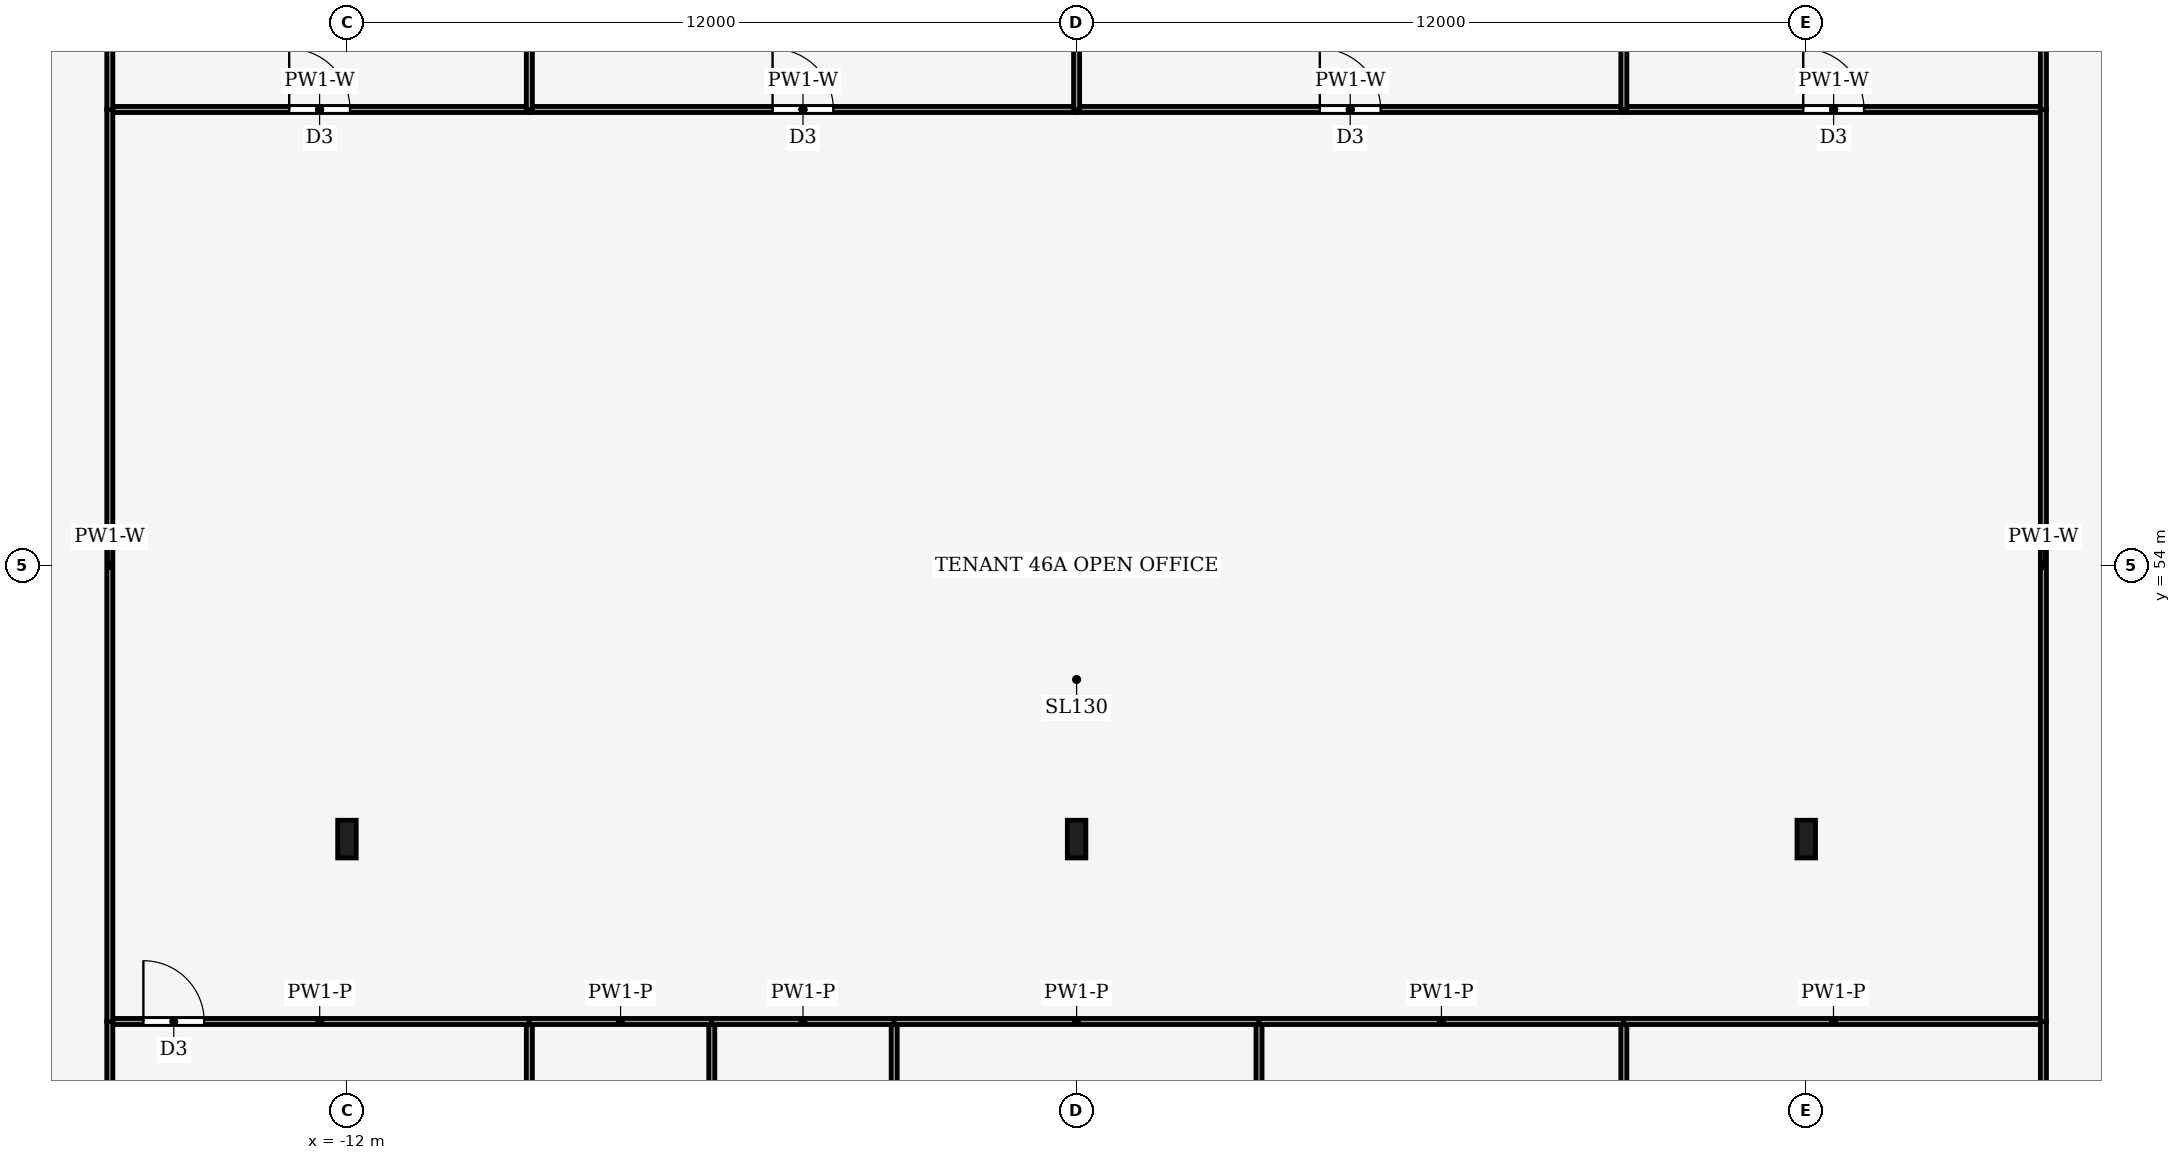
"""IFC4 building model, lengths in metres.
Left out: names, types, materials, properties, quantities, classifications, styles, units other than length and angle.
Written with IfcOpenShell. Run it as: python <this file> out.ifc"""

import sys

from ifc_helpers import new_model, si_unit, direction, frame, frame_2d, origin, origin_2d, place, context, subcontext, project, spatial, rectangle, i_section, extrude, element, fill, save


model = new_model("IFC4")
c1 = context("Model", 3, precision=1e-05, world=origin(), true_north=direction((0.0, 1.0)))
c2 = subcontext(c1, "Body", "Model", "MODEL_VIEW")
j1 = project(units=[si_unit("LENGTHUNIT", "METRE"), si_unit("PLANEANGLEUNIT", "RADIAN")], contexts=[c1])
p1 = place(None, origin())
s1 = spatial("IfcSite", under=j1, at=p1, CompositionType="ELEMENT")
p2 = place(p1, origin())
s2 = spatial("IfcBuilding", under=s1, at=p2, CompositionType="ELEMENT")
p3 = place(p2, frame((0.0, 0.0, 202.0)))
s3 = spatial("IfcBuildingStorey", under=s2, at=p3, CompositionType="ELEMENT", Elevation=202.0)
for number, where, z_axis, x_axis in (
    (1, (-12.0, 49.5, 0.0), (0.0, 0.0, 1.0), (1.0, 0.0, 0.0)),
    (2, (0.0, 49.5, 0.0), (0.0, 0.0, 1.0), (1.0, 0.0, 0.0)),
    (3, (12.0, 49.5, 0.0), (0.0, 0.0, 1.0), (1.0, 0.0, 0.0)),
):
    element("IfcColumn", number, at=place(p3, frame(where, z_axis=z_axis, x_axis=x_axis)), inside=s3, PredefinedType="COLUMN", context=c2, shape_type="SweptSolid", body=[
        extrude(i_section(OverallWidth=0.305, OverallDepth=0.62, WebThickness=0.021, FlangeThickness=0.04, FilletRadius=0.027, at=origin_2d()), origin(), (0.0, 0.0, 1.0), 4.0),
    ])
p4 = place(p3, frame((-9.0, 46.5, 0.0), z_axis=(0.0, 0.0, 1.0), x_axis=(0.0, -1.0, 0.0)))
e4 = element("IfcWall", 4, at=p4, inside=s3, PredefinedType="PARTITIONING", context=c2, shape_type="SweptSolid", body=[
    extrude(rectangle(XDim=5.6, YDim=0.1, at=frame_2d((2.8, 0.0))), origin(), (0.0, 0.0, 1.0), 3.87),
])
p5 = place(p4, frame((2.3, 0.0, 0.0)))
e5 = element("IfcOpeningElement", 5, at=p5, cuts=e4, PredefinedType="OPENING", context=c2, shape_type="SweptSolid", body=[
    extrude(rectangle(XDim=1.0, YDim=2.1, at=frame_2d((0.5, 1.05))), frame((0.0, 0.06, 0.0), z_axis=(0.0, -1.0, 0.0), x_axis=(1.0, 0.0, 0.0)), (0.0, 0.0, 1.0), 0.12),
])
p6 = place(p3, frame((-15.9, 46.5, 0.0), z_axis=(0.0, 0.0, 1.0), x_axis=(1.0, 0.0, 0.0)))
e6 = element("IfcWall", 6, at=p6, inside=s3, PredefinedType="PARTITIONING", context=c2, shape_type="SweptSolid", body=[
    extrude(rectangle(XDim=6.904, YDim=0.1, at=frame_2d((3.452, 0.0))), origin(), (0.0, 0.0, 1.0), 3.44),
])
p7 = place(p6, frame((0.552, 0.0, 0.0)))
e7 = element("IfcOpeningElement", 7, at=p7, cuts=e6, PredefinedType="OPENING", context=c2, shape_type="SweptSolid", body=[
    extrude(rectangle(XDim=1.0, YDim=2.1, at=frame_2d((0.5, 1.05))), frame((0.0, 0.06, 0.0), z_axis=(0.0, -1.0, 0.0), x_axis=(1.0, 0.0, 0.0)), (0.0, 0.0, 1.0), 0.12),
])
p8 = place(p3, frame((-15.9, 46.504, 0.0), z_axis=(0.0, 0.0, 1.0), x_axis=(0.0, -1.0, 0.0)))
e8 = element("IfcWall", 8, at=p8, inside=s3, PredefinedType="PARTITIONING", context=c2, shape_type="SweptSolid", body=[
    extrude(rectangle(XDim=5.608, YDim=0.1, at=frame_2d((2.804, 0.0))), origin(), (0.0, 0.0, 1.0), 3.44),
])
p9 = place(p3, frame((-6.0, 46.5, 0.0), z_axis=(0.0, 0.0, 1.0), x_axis=(0.0, -1.0, 0.0)))
e9 = element("IfcWall", 9, at=p9, inside=s3, PredefinedType="PARTITIONING", context=c2, shape_type="SweptSolid", body=[
    extrude(rectangle(XDim=5.6, YDim=0.1, at=frame_2d((2.8, 0.0))), origin(), (0.0, 0.0, 1.0), 3.87),
])
p10 = place(p9, frame((2.3, 0.0, 0.0)))
e10 = element("IfcOpeningElement", 10, at=p10, cuts=e9, PredefinedType="OPENING", context=c2, shape_type="SweptSolid", body=[
    extrude(rectangle(XDim=1.0, YDim=2.1, at=frame_2d((0.5, 1.05))), frame((0.0, 0.06, 0.0), z_axis=(0.0, -1.0, 0.0), x_axis=(1.0, 0.0, 0.0)), (0.0, 0.0, 1.0), 0.12),
])
p11 = place(p3, frame((-5.996, 46.5, 0.0), z_axis=(0.0, 0.0, 1.0), x_axis=(-1.0, 0.0, 0.0)))
e11 = element("IfcWall", 11, at=p11, inside=s3, PredefinedType="PARTITIONING", context=c2, shape_type="SweptSolid", body=[
    extrude(rectangle(XDim=3.008, YDim=0.1, at=frame_2d((1.504, 0.0))), origin(), (0.0, 0.0, 1.0), 3.44),
])
p12 = place(p3, frame((-3.0, 40.9, 0.0), z_axis=(0.0, 0.0, 1.0), x_axis=(0.0, 1.0, 0.0)))
e12 = element("IfcWall", 12, at=p12, inside=s3, PredefinedType="PARTITIONING", context=c2, shape_type="SweptSolid", body=[
    extrude(rectangle(XDim=5.6, YDim=0.1, at=frame_2d((2.8, 0.0))), origin(), (0.0, 0.0, 1.0), 3.87),
])
p13 = place(p3, frame((-2.996, 46.5, 0.0), z_axis=(0.0, 0.0, 1.0), x_axis=(-1.0, 0.0, 0.0)))
e13 = element("IfcWall", 13, at=p13, inside=s3, PredefinedType="PARTITIONING", context=c2, shape_type="SweptSolid", body=[
    extrude(rectangle(XDim=3.008, YDim=0.1, at=frame_2d((1.504, 0.0))), origin(), (0.0, 0.0, 1.0), 3.44),
])
p14 = place(p3, frame((3.0, 40.9, 0.0), z_axis=(0.0, 0.0, 1.0), x_axis=(0.0, 1.0, 0.0)))
e14 = element("IfcWall", 14, at=p14, inside=s3, PredefinedType="PARTITIONING", context=c2, shape_type="SweptSolid", body=[
    extrude(rectangle(XDim=5.6, YDim=0.1, at=frame_2d((2.8, 0.0))), origin(), (0.0, 0.0, 1.0), 3.87),
])
p15 = place(p3, frame((3.004, 46.5, 0.0), z_axis=(0.0, 0.0, 1.0), x_axis=(-1.0, 0.0, 0.0)))
e15 = element("IfcWall", 15, at=p15, inside=s3, PredefinedType="PARTITIONING", context=c2, shape_type="SweptSolid", body=[
    extrude(rectangle(XDim=6.008, YDim=0.1, at=frame_2d((3.004, 0.0))), origin(), (0.0, 0.0, 1.0), 3.44),
])
p16 = place(p3, frame((9.0, 40.9, 0.0), z_axis=(0.0, 0.0, 1.0), x_axis=(0.0, 1.0, 0.0)))
e16 = element("IfcWall", 16, at=p16, inside=s3, PredefinedType="PARTITIONING", context=c2, shape_type="SweptSolid", body=[
    extrude(rectangle(XDim=5.6, YDim=0.1, at=frame_2d((2.8, 0.0))), origin(), (0.0, 0.0, 1.0), 3.87),
])
p17 = place(p3, frame((9.004, 46.5, 0.0), z_axis=(0.0, 0.0, 1.0), x_axis=(-1.0, 0.0, 0.0)))
e17 = element("IfcWall", 17, at=p17, inside=s3, PredefinedType="PARTITIONING", context=c2, shape_type="SweptSolid", body=[
    extrude(rectangle(XDim=6.008, YDim=0.1, at=frame_2d((3.004, 0.0))), origin(), (0.0, 0.0, 1.0), 3.44),
])
p18 = place(p3, frame((15.9, 46.5, 0.0), z_axis=(0.0, 0.0, 1.0), x_axis=(-1.0, 0.0, 0.0)))
e18 = element("IfcWall", 18, at=p18, inside=s3, PredefinedType="PARTITIONING", context=c2, shape_type="SweptSolid", body=[
    extrude(rectangle(XDim=6.904, YDim=0.1, at=frame_2d((3.452, 0.0))), origin(), (0.0, 0.0, 1.0), 3.44),
])
p19 = place(p3, frame((15.9, 40.896, 0.0), z_axis=(0.0, 0.0, 1.0), x_axis=(0.0, 1.0, 0.0)))
e19 = element("IfcWall", 19, at=p19, inside=s3, PredefinedType="PARTITIONING", context=c2, shape_type="SweptSolid", body=[
    extrude(rectangle(XDim=5.608, YDim=0.1, at=frame_2d((2.804, 0.0))), origin(), (0.0, 0.0, 1.0), 3.44),
])
p20 = place(p3, frame((-15.9, 61.5, 0.0), z_axis=(0.0, 0.0, 1.0), x_axis=(1.0, 0.0, 0.0)))
e20 = element("IfcWall", 20, at=p20, inside=s3, PredefinedType="PARTITIONING", context=c2, shape_type="SweptSolid", body=[
    extrude(rectangle(XDim=6.9, YDim=0.1, at=frame_2d((3.45, 0.0))), origin(), (0.0, 0.0, 1.0), 3.24),
])
p21 = place(p20, frame((2.95, 0.0, 0.0)))
e21 = element("IfcOpeningElement", 21, at=p21, cuts=e20, PredefinedType="OPENING", context=c2, shape_type="SweptSolid", body=[
    extrude(rectangle(XDim=1.0, YDim=2.1, at=frame_2d((0.5, 1.05))), frame((0.0, 0.06, 0.0), z_axis=(0.0, -1.0, 0.0), x_axis=(1.0, 0.0, 0.0)), (0.0, 0.0, 1.0), 0.12),
])
p22 = place(p3, frame((-9.0, 61.5, 0.0), z_axis=(0.0, 0.0, 1.0), x_axis=(1.0, 0.0, 0.0)))
e22 = element("IfcWall", 22, at=p22, inside=s3, PredefinedType="PARTITIONING", context=c2, shape_type="SweptSolid", body=[
    extrude(rectangle(XDim=9.0, YDim=0.1, at=frame_2d((4.5, 0.0))), origin(), (0.0, 0.0, 1.0), 3.24),
])
p23 = place(p22, frame((4.0, 0.0, 0.0)))
e23 = element("IfcOpeningElement", 23, at=p23, cuts=e22, PredefinedType="OPENING", context=c2, shape_type="SweptSolid", body=[
    extrude(rectangle(XDim=1.0, YDim=2.1, at=frame_2d((0.5, 1.05))), frame((0.0, 0.06, 0.0), z_axis=(0.0, -1.0, 0.0), x_axis=(1.0, 0.0, 0.0)), (0.0, 0.0, 1.0), 0.12),
])
p24 = place(p3, frame((0.0, 61.5, 0.0), z_axis=(0.0, 0.0, 1.0), x_axis=(1.0, 0.0, 0.0)))
e24 = element("IfcWall", 24, at=p24, inside=s3, PredefinedType="PARTITIONING", context=c2, shape_type="SweptSolid", body=[
    extrude(rectangle(XDim=9.0, YDim=0.1, at=frame_2d((4.5, 0.0))), origin(), (0.0, 0.0, 1.0), 3.24),
])
p25 = place(p24, frame((4.0, 0.0, 0.0)))
e25 = element("IfcOpeningElement", 25, at=p25, cuts=e24, PredefinedType="OPENING", context=c2, shape_type="SweptSolid", body=[
    extrude(rectangle(XDim=1.0, YDim=2.1, at=frame_2d((0.5, 1.05))), frame((0.0, 0.06, 0.0), z_axis=(0.0, -1.0, 0.0), x_axis=(1.0, 0.0, 0.0)), (0.0, 0.0, 1.0), 0.12),
])
p26 = place(p3, frame((9.0, 61.5, 0.0), z_axis=(0.0, 0.0, 1.0), x_axis=(1.0, 0.0, 0.0)))
e26 = element("IfcWall", 26, at=p26, inside=s3, PredefinedType="PARTITIONING", context=c2, shape_type="SweptSolid", body=[
    extrude(rectangle(XDim=6.9, YDim=0.1, at=frame_2d((3.45, 0.0))), origin(), (0.0, 0.0, 1.0), 3.24),
])
p27 = place(p26, frame((2.95, 0.0, 0.0)))
e27 = element("IfcOpeningElement", 27, at=p27, cuts=e26, PredefinedType="OPENING", context=c2, shape_type="SweptSolid", body=[
    extrude(rectangle(XDim=1.0, YDim=2.1, at=frame_2d((0.5, 1.05))), frame((0.0, 0.06, 0.0), z_axis=(0.0, -1.0, 0.0), x_axis=(1.0, 0.0, 0.0)), (0.0, 0.0, 1.0), 0.12),
])
for number, where, z_axis, x_axis in (
    (28, (-15.9, 61.504, 0.0), (0.0, 0.0, 1.0), (0.0, -1.0, 0.0)),
    (29, (15.9, 46.496, 0.0), (0.0, 0.0, 1.0), (0.0, 1.0, 0.0)),
):
    element("IfcWall", number, at=place(p3, frame(where, z_axis=z_axis, x_axis=x_axis)), inside=s3, PredefinedType="PARTITIONING", context=c2, shape_type="SweptSolid", body=[
        extrude(rectangle(XDim=15.008, YDim=0.1, at=frame_2d((7.504, 0.0))), origin(), (0.0, 0.0, 1.0), 3.24),
    ])
p28 = place(p3, frame((-9.0, 61.5, 0.0), z_axis=(0.0, 0.0, 1.0), x_axis=(0.0, 1.0, 0.0)))
e30 = element("IfcWall", 30, at=p28, inside=s3, PredefinedType="PARTITIONING", context=c2, shape_type="SweptSolid", body=[
    extrude(rectangle(XDim=6.83, YDim=0.1, at=frame_2d((3.415, 0.0))), origin(), (0.0, 0.0, 1.0), 3.04),
])
p29 = place(p3, frame((-15.9, 68.905, 0.0), z_axis=(0.0, 0.0, 1.0), x_axis=(0.0, -1.0, 0.0)))
e31 = element("IfcWall", 31, at=p29, inside=s3, PredefinedType="PARTITIONING", context=c2, shape_type="SweptSolid", body=[
    extrude(rectangle(XDim=7.409, YDim=0.1, at=frame_2d((3.705, 0.0))), origin(), (0.0, 0.0, 1.0), 3.04),
])
p30 = place(p3, frame((0.0, 61.5, 0.0), z_axis=(0.0, 0.0, 1.0), x_axis=(0.0, 1.0, 0.0)))
e32 = element("IfcWall", 32, at=p30, inside=s3, PredefinedType="PARTITIONING", context=c2, shape_type="SweptSolid", body=[
    extrude(rectangle(XDim=6.08, YDim=0.1, at=frame_2d((3.04, 0.0))), origin(), (0.0, 0.0, 1.0), 3.04),
])
p31 = place(p3, frame((9.0, 61.5, 0.0), z_axis=(0.0, 0.0, 1.0), x_axis=(0.0, 1.0, 0.0)))
e33 = element("IfcWall", 33, at=p31, inside=s3, PredefinedType="PARTITIONING", context=c2, shape_type="SweptSolid", body=[
    extrude(rectangle(XDim=6.83, YDim=0.1, at=frame_2d((3.415, 0.0))), origin(), (0.0, 0.0, 1.0), 3.04),
])
p32 = place(p3, frame((15.9, 61.496, 0.0), z_axis=(0.0, 0.0, 1.0), x_axis=(0.0, 1.0, 0.0)))
e34 = element("IfcWall", 34, at=p32, inside=s3, PredefinedType="PARTITIONING", context=c2, shape_type="SweptSolid", body=[
    extrude(rectangle(XDim=7.409, YDim=0.1, at=frame_2d((3.705, 0.0))), origin(), (0.0, 0.0, 1.0), 3.04),
])
p33 = place(p7, origin())
e35 = element("IfcDoor", 35, at=p33, inside=s3, OperationType="SINGLE_SWING_LEFT", PredefinedType="DOOR", context=c2, shape_type="SweptSolid", body=[
    extrude(rectangle(XDim=1.0, YDim=2.1, at=frame_2d((0.5, 1.05))), frame((0.0, 0.025, 0.0), z_axis=(0.0, -1.0, 0.0), x_axis=(1.0, 0.0, 0.0)), (0.0, 0.0, 1.0), 0.05),
])
fill(e7, e35)
p34 = place(p21, origin())
e36 = element("IfcDoor", 36, at=p34, inside=s3, OperationType="SINGLE_SWING_LEFT", PredefinedType="DOOR", context=c2, shape_type="SweptSolid", body=[
    extrude(rectangle(XDim=1.0, YDim=2.1, at=frame_2d((0.5, 1.05))), frame((0.0, 0.025, 0.0), z_axis=(0.0, -1.0, 0.0), x_axis=(1.0, 0.0, 0.0)), (0.0, 0.0, 1.0), 0.05),
])
fill(e21, e36)
p35 = place(p23, origin())
e37 = element("IfcDoor", 37, at=p35, inside=s3, OperationType="SINGLE_SWING_RIGHT", PredefinedType="DOOR", context=c2, shape_type="SweptSolid", body=[
    extrude(rectangle(XDim=1.0, YDim=2.1, at=frame_2d((0.5, 1.05))), frame((0.0, 0.025, 0.0), z_axis=(0.0, -1.0, 0.0), x_axis=(1.0, 0.0, 0.0)), (0.0, 0.0, 1.0), 0.05),
])
fill(e23, e37)
p36 = place(p25, origin())
e38 = element("IfcDoor", 38, at=p36, inside=s3, OperationType="SINGLE_SWING_LEFT", PredefinedType="DOOR", context=c2, shape_type="SweptSolid", body=[
    extrude(rectangle(XDim=1.0, YDim=2.1, at=frame_2d((0.5, 1.05))), frame((0.0, 0.025, 0.0), z_axis=(0.0, -1.0, 0.0), x_axis=(1.0, 0.0, 0.0)), (0.0, 0.0, 1.0), 0.05),
])
fill(e25, e38)
p37 = place(p27, origin())
e39 = element("IfcDoor", 39, at=p37, inside=s3, OperationType="SINGLE_SWING_RIGHT", PredefinedType="DOOR", context=c2, shape_type="SweptSolid", body=[
    extrude(rectangle(XDim=1.0, YDim=2.1, at=frame_2d((0.5, 1.05))), frame((0.0, 0.025, 0.0), z_axis=(0.0, -1.0, 0.0), x_axis=(1.0, 0.0, 0.0)), (0.0, 0.0, 1.0), 0.05),
])
fill(e27, e39)
save(model, sys.argv[1])
